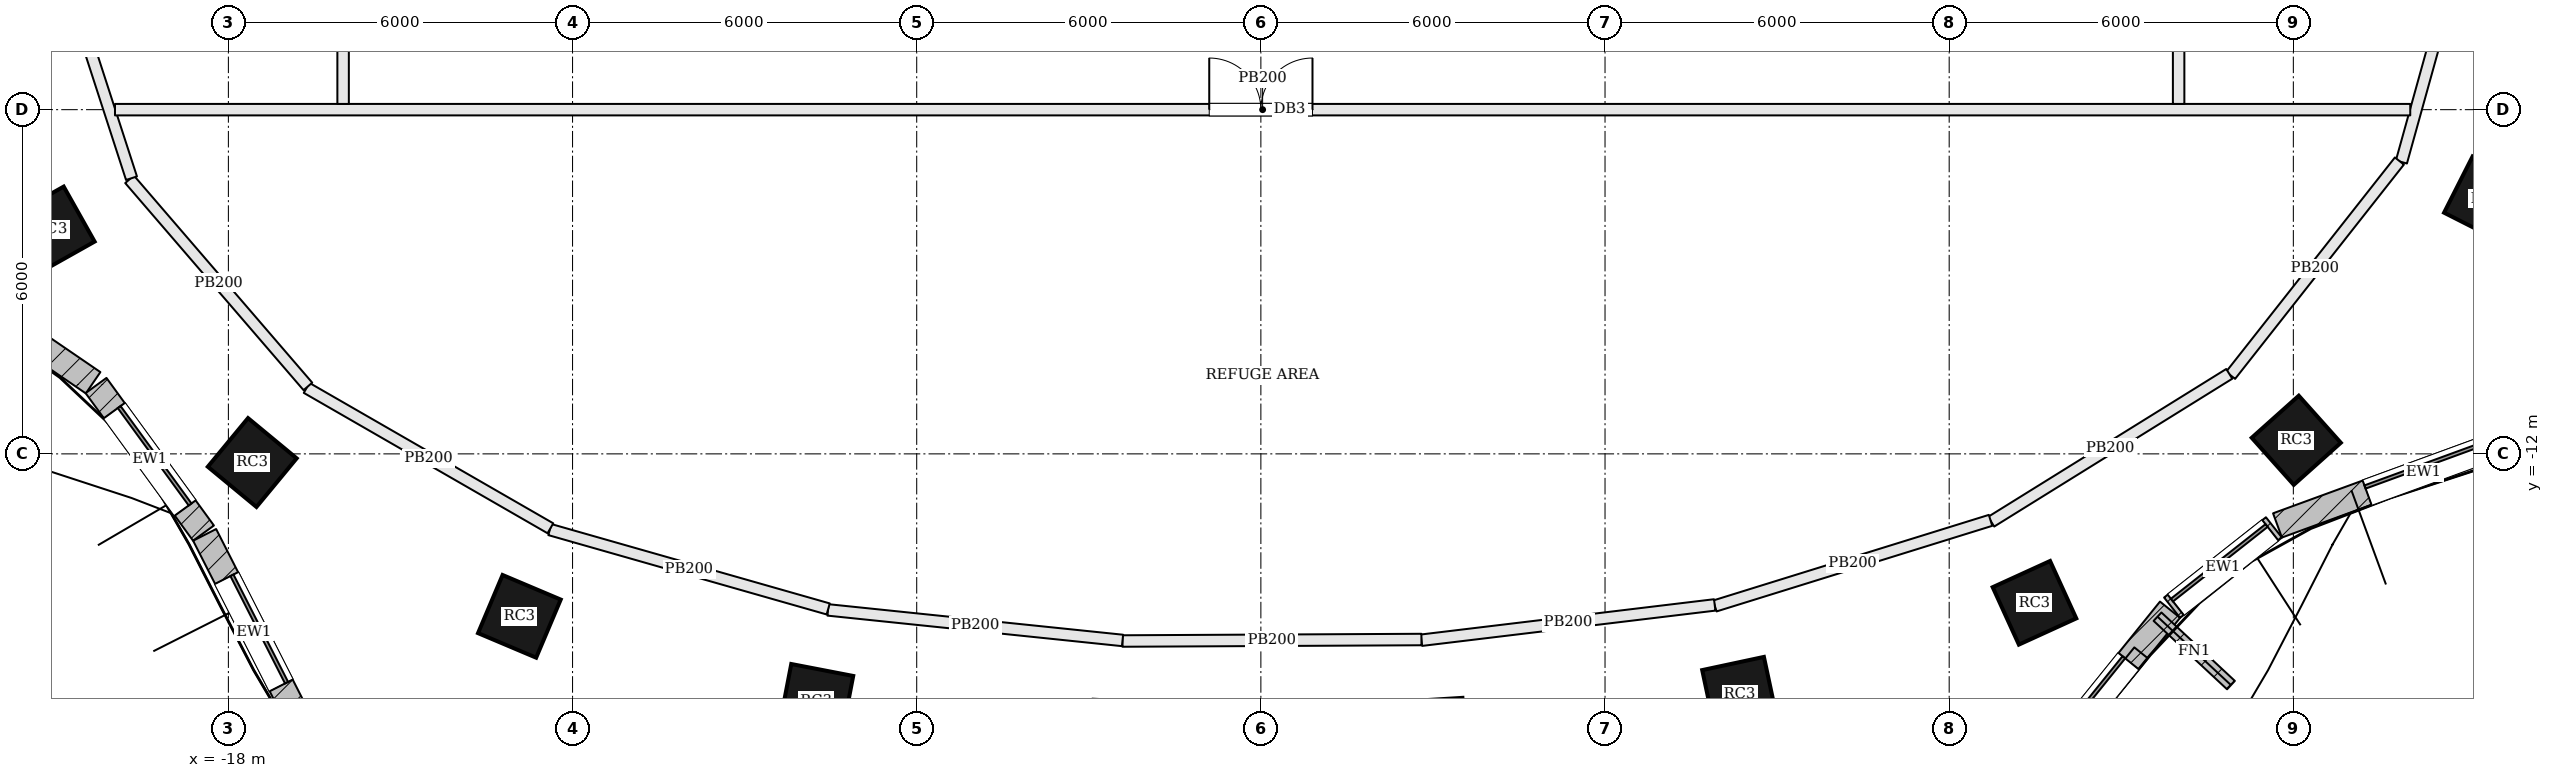
"""IFC4 building model, lengths in metres.
Left out: names, types, materials, properties, quantities, classifications, styles, units other than length and angle.
Written with IfcOpenShell. Run it as: python <this file> out.ifc"""

import sys

from ifc_helpers import new_model, si_unit, direction, frame, frame_2d, origin, origin_2d, place, context, subcontext, project, spatial, rectangle, extrude, element, fill, save


model = new_model("IFC4")
c1 = context("Model", 3, precision=1e-05, world=origin(), true_north=direction((0.0, 1.0)))
c2 = subcontext(c1, "Body", "Model", "MODEL_VIEW")
j1 = project(units=[si_unit("LENGTHUNIT", "METRE"), si_unit("PLANEANGLEUNIT", "RADIAN")], contexts=[c1])
p1 = place(None, origin())
s1 = spatial("IfcSite", under=j1, at=p1, CompositionType="ELEMENT")
p2 = place(p1, origin())
s2 = spatial("IfcBuilding", under=s1, at=p2, CompositionType="ELEMENT")
p3 = place(p2, frame((0.0, 0.0, 150.0)))
s3 = spatial("IfcBuildingStorey", under=s2, at=p3, CompositionType="ELEMENT", Elevation=150.0)
for number, where, z_axis, x_axis in (
    (1, (-21.081, -8.09, 0.0), (0.0, 0.0, 1.0), (0.49, -0.872, 0.0)),
    (2, (-17.584, -12.151, 0.0), (0.0, 0.0, 1.0), (0.771, -0.637, 0.0)),
    (3, (-12.927, -14.832, 0.0), (0.0, 0.0, 1.0), (0.921, -0.389, 0.0)),
    (4, (-7.751, -16.307, 0.0), (0.0, 0.0, 1.0), (0.982, -0.189, 0.0)),
    (5, (2.999, -16.836, 0.0), (0.0, 0.0, 1.0), (0.998, 0.062, 0.0)),
    (6, (8.347, -16.192, 0.0), (0.0, 0.0, 1.0), (0.978, 0.209, 0.0)),
    (7, (13.487, -14.596, 0.0), (0.0, 0.0, 1.0), (0.91, 0.415, 0.0)),
    (8, (18.051, -11.763, 0.0), (0.0, 0.0, 1.0), (0.746, 0.666, 0.0)),
    (9, (21.367, -7.554, 0.0), (0.0, 0.0, 1.0), (0.452, 0.892, 0.0)),
):
    element("IfcColumn", number, at=place(p3, frame(where, z_axis=z_axis, x_axis=x_axis)), inside=s3, PredefinedType="COLUMN", context=c2, shape_type="SweptSolid", body=[
        extrude(rectangle(XDim=1.1, YDim=1.1, at=origin_2d()), origin(), (0.0, 0.0, 1.0), 3.9),
    ])
p4 = place(p3, frame((-24.69, -7.8, 0.0), z_axis=(0.0, 0.0, 1.0), x_axis=(0.825631274437, -0.564210066085, 0.0)))
e10 = element("IfcWall", 10, at=p4, inside=s3, PredefinedType="SOLIDWALL", context=c2, shape_type="SweptSolid", body=[
    extrude(rectangle(XDim=5.247, YDim=0.45, at=frame_2d((2.623, 0.0))), origin(), (0.0, 0.0, 1.0), 3.7),
])
p5 = place(p4, frame((1.573, 0.0, 0.9)))
e11 = element("IfcOpeningElement", 11, at=p5, cuts=e10, PredefinedType="OPENING", context=c2, shape_type="SweptSolid", body=[
    extrude(rectangle(XDim=2.1, YDim=2.3, at=frame_2d((1.05, 1.15))), frame((0.0, 0.235, 0.0), z_axis=(0.0, -1.0, 0.0), x_axis=(1.0, 0.0, 0.0)), (0.0, 0.0, 1.0), 0.47),
])
p6 = place(p3, frame((-20.307, -10.808, 0.0), z_axis=(0.0, 0.0, 1.0), x_axis=(0.588623179346, -0.808407541242, 0.0)))
e12 = element("IfcWall", 12, at=p6, inside=s3, PredefinedType="SOLIDWALL", context=c2, shape_type="SweptSolid", body=[
    extrude(rectangle(XDim=3.183, YDim=0.45, at=frame_2d((1.591, 0.0))), origin(), (0.0, 0.0, 1.0), 3.7),
])
p7 = place(p6, frame((0.541, 0.0, 0.9)))
e13 = element("IfcOpeningElement", 13, at=p7, cuts=e12, PredefinedType="OPENING", context=c2, shape_type="SweptSolid", body=[
    extrude(rectangle(XDim=2.1, YDim=2.3, at=frame_2d((1.05, 1.15))), frame((0.0, 0.235, 0.0), z_axis=(0.0, -1.0, 0.0), x_axis=(1.0, 0.0, 0.0)), (0.0, 0.0, 1.0), 0.47),
])
p8 = place(p3, frame((-18.414, -13.412, 0.0), z_axis=(0.0, 0.0, 1.0), x_axis=(0.453339558905, -0.891337895712, 0.0)))
e14 = element("IfcWall", 14, at=p8, inside=s3, PredefinedType="SOLIDWALL", context=c2, shape_type="SweptSolid", body=[
    extrude(rectangle(XDim=3.788, YDim=0.45, at=frame_2d((1.894, 0.0))), origin(), (0.0, 0.0, 1.0), 3.7),
])
p9 = place(p8, frame((0.844, 0.0, 0.9)))
e15 = element("IfcOpeningElement", 15, at=p9, cuts=e14, PredefinedType="OPENING", context=c2, shape_type="SweptSolid", body=[
    extrude(rectangle(XDim=2.1, YDim=2.3, at=frame_2d((1.05, 1.15))), frame((0.0, 0.235, 0.0), z_axis=(0.0, -1.0, 0.0), x_axis=(1.0, 0.0, 0.0)), (0.0, 0.0, 1.0), 0.47),
])
p10 = place(p3, frame((13.085, -18.14, 0.0), z_axis=(0.0, 0.0, 1.0), x_axis=(0.628273836344, 0.777992279245, 0.0)))
e16 = element("IfcWall", 16, at=p10, inside=s3, PredefinedType="SOLIDWALL", context=c2, shape_type="SweptSolid", body=[
    extrude(rectangle(XDim=4.401, YDim=0.45, at=frame_2d((2.201, 0.0))), origin(), (0.0, 0.0, 1.0), 3.7),
])
p11 = place(p10, frame((1.151, 0.0, 0.9)))
e17 = element("IfcOpeningElement", 17, at=p11, cuts=e16, PredefinedType="OPENING", context=c2, shape_type="SweptSolid", body=[
    extrude(rectangle(XDim=2.1, YDim=2.3, at=frame_2d((1.05, 1.15))), frame((0.0, 0.235, 0.0), z_axis=(0.0, -1.0, 0.0), x_axis=(1.0, 0.0, 0.0)), (0.0, 0.0, 1.0), 0.47),
])
p12 = place(p3, frame((15.886, -14.681, 0.0), z_axis=(0.0, 0.0, 1.0), x_axis=(0.78545189886, 0.618922704849, 0.0)))
e18 = element("IfcWall", 18, at=p12, inside=s3, PredefinedType="SOLIDWALL", context=c2, shape_type="SweptSolid", body=[
    extrude(rectangle(XDim=2.261, YDim=0.45, at=frame_2d((1.13, 0.0))), origin(), (0.0, 0.0, 1.0), 3.7),
])
p13 = place(p12, frame((0.08, 0.0, 0.9)))
e19 = element("IfcOpeningElement", 19, at=p13, cuts=e18, PredefinedType="OPENING", context=c2, shape_type="SweptSolid", body=[
    extrude(rectangle(XDim=2.1, YDim=2.3, at=frame_2d((1.05, 1.15))), frame((0.0, 0.235, 0.0), z_axis=(0.0, -1.0, 0.0), x_axis=(1.0, 0.0, 0.0)), (0.0, 0.0, 1.0), 0.47),
])
p14 = place(p3, frame((17.724, -13.247, 0.0), z_axis=(0.0, 0.0, 1.0), x_axis=(0.939241771593, 0.343256310203, 0.0)))
e20 = element("IfcWall", 20, at=p14, inside=s3, PredefinedType="SOLIDWALL", context=c2, shape_type="SweptSolid", body=[
    extrude(rectangle(XDim=5.426, YDim=0.45, at=frame_2d((2.713, 0.0))), origin(), (0.0, 0.0, 1.0), 3.7),
])
p15 = place(p14, frame((1.663, 0.0, 0.9)))
e21 = element("IfcOpeningElement", 21, at=p15, cuts=e20, PredefinedType="OPENING", context=c2, shape_type="SweptSolid", body=[
    extrude(rectangle(XDim=2.1, YDim=2.3, at=frame_2d((1.05, 1.15))), frame((0.0, 0.235, 0.0), z_axis=(0.0, -1.0, 0.0), x_axis=(1.0, 0.0, 0.0)), (0.0, 0.0, 1.0), 0.47),
])
p16 = place(p3, frame((15.632, -14.838, 0.0), z_axis=(0.0, 0.0, 1.0), x_axis=(0.73177399504, -0.681547371929, 0.0)))
e22 = element("IfcWall", 22, at=p16, inside=s3, PredefinedType="SOLIDWALL", context=c2, shape_type="SweptSolid", body=[
    extrude(rectangle(XDim=1.75, YDim=0.2, at=frame_2d((0.875, 0.0))), origin(), (0.0, 0.0, 1.0), 3.7),
])
p17 = place(p3, frame((13.194, -18.13, 3.9), z_axis=(0.0, 0.0, 1.0), x_axis=(0.628264043073, 0.778000187777, 0.0)))
e23 = element("IfcWall", 23, at=p17, inside=s3, PredefinedType="PARAPET", context=c2, shape_type="SweptSolid", body=[
    extrude(rectangle(XDim=3.422, YDim=0.3, at=frame_2d((1.711, 0.0))), origin(), (0.0, 0.0, 1.0), 1.1),
])
p18 = place(p3, frame((21.226, -2.085, 0.0), z_axis=(0.0, 0.0, 1.0), x_axis=(-0.267859993319, -0.963457847536, 0.0)))
e24 = element("IfcWall", 24, at=p18, inside=s3, PredefinedType="PARTITIONING", context=c2, shape_type="SweptSolid", body=[
    extrude(rectangle(XDim=5.01, YDim=0.2, at=frame_2d((2.505, 0.0))), origin(), (0.0, 0.0, 1.0), 3.7),
])
p19 = place(p3, frame((19.849, -6.895, 0.0), z_axis=(0.0, 0.0, 1.0), x_axis=(-0.618811760178, -0.785539308669, 0.0)))
e25 = element("IfcWall", 25, at=p19, inside=s3, PredefinedType="PARTITIONING", context=c2, shape_type="SweptSolid", body=[
    extrude(rectangle(XDim=4.756, YDim=0.2, at=frame_2d((2.378, 0.0))), origin(), (0.0, 0.0, 1.0), 3.7),
])
p20 = place(p3, frame((16.883, -10.605, 0.0), z_axis=(0.0, 0.0, 1.0), x_axis=(-0.849608511022, -0.527413858368, 0.0)))
e26 = element("IfcWall", 26, at=p20, inside=s3, PredefinedType="PARTITIONING", context=c2, shape_type="SweptSolid", body=[
    extrude(rectangle(XDim=4.886, YDim=0.2, at=frame_2d((2.443, 0.0))), origin(), (0.0, 0.0, 1.0), 3.7),
])
p21 = place(p3, frame((12.721, -13.159, 0.0), z_axis=(0.0, 0.0, 1.0), x_axis=(-0.955038559717, -0.296481617396, 0.0)))
e27 = element("IfcWall", 27, at=p21, inside=s3, PredefinedType="PARTITIONING", context=c2, shape_type="SweptSolid", body=[
    extrude(rectangle(XDim=5.032, YDim=0.2, at=frame_2d((2.516, 0.0))), origin(), (0.0, 0.0, 1.0), 3.7),
])
p22 = place(p3, frame((7.912, -14.633, 0.0), z_axis=(0.0, 0.0, 1.0), x_axis=(-0.992841344803, -0.119440629808, 0.0)))
e28 = element("IfcWall", 28, at=p22, inside=s3, PredefinedType="PARTITIONING", context=c2, shape_type="SweptSolid", body=[
    extrude(rectangle(XDim=5.149, YDim=0.2, at=frame_2d((2.574, 0.0))), origin(), (0.0, 0.0, 1.0), 3.7),
])
p23 = place(p3, frame((2.799, -15.236, 0.0), z_axis=(0.0, 0.0, 1.0), x_axis=(-0.9999876741, -0.004965042553, 0.0)))
e29 = element("IfcWall", 29, at=p23, inside=s3, PredefinedType="PARTITIONING", context=c2, shape_type="SweptSolid", body=[
    extrude(rectangle(XDim=5.212, YDim=0.2, at=frame_2d((2.606, 0.0))), origin(), (0.0, 0.0, 1.0), 3.7),
])
p24 = place(p3, frame((-2.412, -15.252, 0.0), z_axis=(0.0, 0.0, 1.0), x_axis=(-0.994673915242, 0.103071830955, 0.0)))
e30 = element("IfcWall", 30, at=p24, inside=s3, PredefinedType="PARTITIONING", context=c2, shape_type="SweptSolid", body=[
    extrude(rectangle(XDim=5.161, YDim=0.2, at=frame_2d((2.581, 0.0))), origin(), (0.0, 0.0, 1.0), 3.7),
])
p25 = place(p3, frame((-7.543, -14.703, 0.0), z_axis=(0.0, 0.0, 1.0), x_axis=(-0.961706339668, 0.27408195169, 0.0)))
e31 = element("IfcWall", 31, at=p25, inside=s3, PredefinedType="PARTITIONING", context=c2, shape_type="SweptSolid", body=[
    extrude(rectangle(XDim=5.045, YDim=0.2, at=frame_2d((2.522, 0.0))), origin(), (0.0, 0.0, 1.0), 3.7),
])
p26 = place(p3, frame((-12.386, -13.297, 0.0), z_axis=(0.0, 0.0, 1.0), x_axis=(-0.866617890559, 0.498972375751, 0.0)))
e32 = element("IfcWall", 32, at=p26, inside=s3, PredefinedType="PARTITIONING", context=c2, shape_type="SweptSolid", body=[
    extrude(rectangle(XDim=4.904, YDim=0.2, at=frame_2d((2.452, 0.0))), origin(), (0.0, 0.0, 1.0), 3.7),
])
p27 = place(p3, frame((-16.614, -10.824, 0.0), z_axis=(0.0, 0.0, 1.0), x_axis=(-0.652570543166, 0.757727976382, 0.0)))
e33 = element("IfcWall", 33, at=p27, inside=s3, PredefinedType="PARTITIONING", context=c2, shape_type="SweptSolid", body=[
    extrude(rectangle(XDim=4.764, YDim=0.2, at=frame_2d((2.382, 0.0))), origin(), (0.0, 0.0, 1.0), 3.7),
])
p28 = place(p3, frame((-19.689, -7.195, 0.0), z_axis=(0.0, 0.0, 1.0), x_axis=(-0.308517152125, 0.951218779695, 0.0)))
e34 = element("IfcWall", 34, at=p28, inside=s3, PredefinedType="PARTITIONING", context=c2, shape_type="SweptSolid", body=[
    extrude(rectangle(XDim=4.794, YDim=0.2, at=frame_2d((2.397, 0.0))), origin(), (0.0, 0.0, 1.0), 3.7),
])
p29 = place(p3, frame((-19.977, -6.0, 0.0), z_axis=(0.0, 0.0, 1.0), x_axis=(1.0, 0.0, 0.0)))
e35 = element("IfcWall", 35, at=p29, inside=s3, PredefinedType="PARTITIONING", context=c2, shape_type="SweptSolid", body=[
    extrude(rectangle(XDim=40.015, YDim=0.2, at=frame_2d((20.008, 0.0))), origin(), (0.0, 0.0, 1.0), 3.7),
])
p30 = place(p29, frame((19.077, 0.0, 0.0)))
e36 = element("IfcOpeningElement", 36, at=p30, cuts=e35, PredefinedType="OPENING", context=c2, shape_type="SweptSolid", body=[
    extrude(rectangle(XDim=1.8, YDim=2.1, at=frame_2d((0.9, 1.05))), frame((0.0, 0.11, 0.0), z_axis=(0.0, -1.0, 0.0), x_axis=(1.0, 0.0, 0.0)), (0.0, 0.0, 1.0), 0.22),
])
p31 = place(p3, frame((-16.0, 11.053, 0.0), z_axis=(0.0, 0.0, 1.0), x_axis=(0.0, -1.0, 0.0)))
e37 = element("IfcWall", 37, at=p31, inside=s3, PredefinedType="PARTITIONING", context=c2, shape_type="SweptSolid", body=[
    extrude(rectangle(XDim=16.953, YDim=0.2, at=frame_2d((8.477, 0.0))), origin(), (0.0, 0.0, 1.0), 3.7),
])
p32 = place(p31, frame((6.077, 0.0, 0.0)))
e38 = element("IfcOpeningElement", 38, at=p32, cuts=e37, PredefinedType="OPENING", context=c2, shape_type="SweptSolid", body=[
    extrude(rectangle(XDim=1.8, YDim=2.1, at=frame_2d((0.9, 1.05))), frame((0.0, 0.11, 0.0), z_axis=(0.0, -1.0, 0.0), x_axis=(1.0, 0.0, 0.0)), (0.0, 0.0, 1.0), 0.22),
])
p33 = place(p3, frame((16.0, -5.9, 0.0), z_axis=(0.0, 0.0, 1.0), x_axis=(0.0, 1.0, 0.0)))
e39 = element("IfcWall", 39, at=p33, inside=s3, PredefinedType="PARTITIONING", context=c2, shape_type="SweptSolid", body=[
    extrude(rectangle(XDim=17.017, YDim=0.2, at=frame_2d((8.508, 0.0))), origin(), (0.0, 0.0, 1.0), 3.7),
])
p34 = place(p33, frame((9.108, 0.0, 0.0)))
e40 = element("IfcOpeningElement", 40, at=p34, cuts=e39, PredefinedType="OPENING", context=c2, shape_type="SweptSolid", body=[
    extrude(rectangle(XDim=1.8, YDim=2.1, at=frame_2d((0.9, 1.05))), frame((0.0, 0.11, 0.0), z_axis=(0.0, -1.0, 0.0), x_axis=(1.0, 0.0, 0.0)), (0.0, 0.0, 1.0), 0.22),
])
p35 = place(p7, origin())
e41 = element("IfcWindow", 41, at=p35, inside=s3, PartitioningType="SINGLE_PANEL", PredefinedType="WINDOW", context=c2, shape_type="SweptSolid", body=[
    extrude(rectangle(XDim=2.1, YDim=2.3, at=frame_2d((1.05, 1.15))), frame((0.0, 0.135, 0.0), z_axis=(0.0, -1.0, 0.0), x_axis=(1.0, 0.0, 0.0)), (0.0, 0.0, 1.0), 0.06),
])
fill(e13, e41)
p36 = place(p9, origin())
e42 = element("IfcWindow", 42, at=p36, inside=s3, PartitioningType="SINGLE_PANEL", PredefinedType="WINDOW", context=c2, shape_type="SweptSolid", body=[
    extrude(rectangle(XDim=2.1, YDim=2.3, at=frame_2d((1.05, 1.15))), frame((0.0, 0.135, 0.0), z_axis=(0.0, -1.0, 0.0), x_axis=(1.0, 0.0, 0.0)), (0.0, 0.0, 1.0), 0.06),
])
fill(e15, e42)
p37 = place(p11, origin())
e43 = element("IfcWindow", 43, at=p37, inside=s3, PartitioningType="SINGLE_PANEL", PredefinedType="WINDOW", context=c2, shape_type="SweptSolid", body=[
    extrude(rectangle(XDim=2.1, YDim=2.3, at=frame_2d((1.05, 1.15))), frame((0.0, 0.135, 0.0), z_axis=(0.0, -1.0, 0.0), x_axis=(1.0, 0.0, 0.0)), (0.0, 0.0, 1.0), 0.06),
])
fill(e17, e43)
p38 = place(p13, origin())
e44 = element("IfcWindow", 44, at=p38, inside=s3, PartitioningType="SINGLE_PANEL", PredefinedType="WINDOW", context=c2, shape_type="SweptSolid", body=[
    extrude(rectangle(XDim=2.1, YDim=2.3, at=frame_2d((1.05, 1.15))), frame((0.0, 0.135, 0.0), z_axis=(0.0, -1.0, 0.0), x_axis=(1.0, 0.0, 0.0)), (0.0, 0.0, 1.0), 0.06),
])
fill(e19, e44)
p39 = place(p15, origin())
e45 = element("IfcWindow", 45, at=p39, inside=s3, PartitioningType="SINGLE_PANEL", PredefinedType="WINDOW", context=c2, shape_type="SweptSolid", body=[
    extrude(rectangle(XDim=2.1, YDim=2.3, at=frame_2d((1.05, 1.15))), frame((0.0, 0.135, 0.0), z_axis=(0.0, -1.0, 0.0), x_axis=(1.0, 0.0, 0.0)), (0.0, 0.0, 1.0), 0.06),
])
fill(e21, e45)
p40 = place(p30, origin())
e46 = element("IfcDoor", 46, at=p40, inside=s3, OperationType="DOUBLE_DOOR_SINGLE_SWING", PredefinedType="DOOR", context=c2, shape_type="SweptSolid", body=[
    extrude(rectangle(XDim=1.8, YDim=2.1, at=frame_2d((0.9, 1.05))), frame((0.0, 0.025, 0.0), z_axis=(0.0, -1.0, 0.0), x_axis=(1.0, 0.0, 0.0)), (0.0, 0.0, 1.0), 0.05),
])
fill(e36, e46)
save(model, sys.argv[1])
